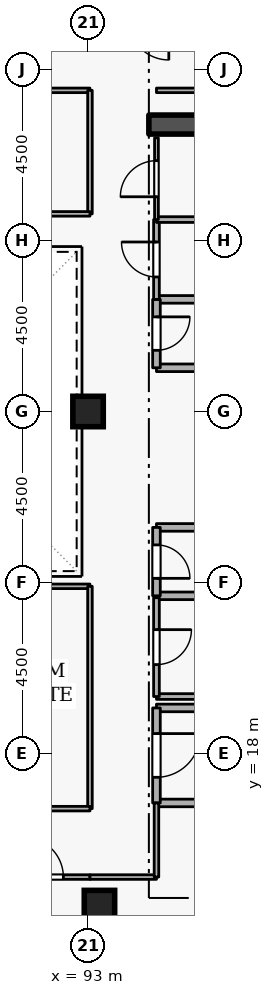
"""IFC4 building model, lengths in metres.
Left out: names, types, materials, properties, quantities, classifications, styles, units other than length and angle.
Written with IfcOpenShell. Run it as: python <this file> out.ifc"""

import sys

from ifc_helpers import new_model, si_unit, direction, frame, frame_2d, origin, origin_2d, place, context, subcontext, project, spatial, rectangle, extrude, element, fill, save


model = new_model("IFC4")
c1 = context("Model", 3, precision=1e-05, world=origin(), true_north=direction((0.0, 1.0)))
c2 = subcontext(c1, "Body", "Model", "MODEL_VIEW")
j1 = project(units=[si_unit("LENGTHUNIT", "METRE"), si_unit("PLANEANGLEUNIT", "RADIAN")], contexts=[c1])
p1 = place(None, origin())
s1 = spatial("IfcSite", under=j1, at=p1, CompositionType="ELEMENT")
p2 = place(p1, origin())
s2 = spatial("IfcBuilding", under=s1, at=p2, CompositionType="ELEMENT")
p3 = place(p2, frame((0.0, 0.0, 254.7)))
s3 = spatial("IfcBuildingStorey", under=s2, at=p3, CompositionType="ELEMENT", Elevation=254.7)
p4 = place(p3, frame((94.6, 34.55, 0.0), z_axis=(0.0, 0.0, 1.0), x_axis=(1.0, 0.0, 0.0)))
e1 = element("IfcWall", 1, at=p4, inside=s3, PredefinedType="SHEAR", context=c2, shape_type="SweptSolid", body=[
    extrude(rectangle(XDim=5.8, YDim=0.5, at=frame_2d((2.9, 0.0))), origin(), (0.0, 0.0, 1.0), 3.6),
])
for number, where, z_axis, x_axis in (
    (2, (93.3, 14.0, 0.0), (0.0, 0.0, 1.0), (1.0, 0.0, 0.0)),
    (3, (93.0, 27.0, 0.0), (0.0, 0.0, 1.0), (1.0, 0.0, 0.0)),
):
    element("IfcColumn", number, at=place(p3, frame(where, z_axis=z_axis, x_axis=x_axis)), inside=s3, PredefinedType="COLUMN", context=c2, shape_type="SweptSolid", body=[
        extrude(rectangle(XDim=0.8, YDim=0.8, at=origin_2d()), origin(), (0.0, 0.0, 1.0), 3.6),
    ])
p5 = place(p3, frame((94.8, 16.7, 0.0), z_axis=(0.0, 0.0, 1.0), x_axis=(1.0, 0.0, 0.0)))
e4 = element("IfcWall", 4, at=p5, inside=s3, PredefinedType="STANDARD", context=c2, shape_type="SweptSolid", body=[
    extrude(rectangle(XDim=5.7, YDim=0.2, at=frame_2d((2.85, 0.0))), origin(), (0.0, 0.0, 1.0), 3.32),
])
p6 = place(p3, frame((97.1, 19.2, 0.0), z_axis=(0.0, 0.0, 1.0), x_axis=(-1.0, 0.0, 0.0)))
e5 = element("IfcWall", 5, at=p6, inside=s3, PredefinedType="STANDARD", context=c2, shape_type="SweptSolid", body=[
    extrude(rectangle(XDim=2.3, YDim=0.2, at=frame_2d((1.15, 0.0))), origin(), (0.0, 0.0, 1.0), 2.525),
])
p7 = place(p3, frame((94.8, 19.2, 0.0), z_axis=(0.0, 0.0, 1.0), x_axis=(0.0, -1.0, 0.0)))
e6 = element("IfcWall", 6, at=p7, inside=s3, PredefinedType="STANDARD", context=c2, shape_type="SweptSolid", body=[
    extrude(rectangle(XDim=2.5, YDim=0.2, at=frame_2d((1.25, 0.0))), origin(), (0.0, 0.0, 1.0), 3.32),
])
p8 = place(p7, frame((0.675, 0.0, 0.0)))
e7 = element("IfcOpeningElement", 7, at=p8, cuts=e6, PredefinedType="OPENING", context=c2, shape_type="SweptSolid", body=[
    extrude(rectangle(XDim=1.15, YDim=2.1, at=frame_2d((0.575, 1.05))), frame((0.0, 0.11, 0.0), z_axis=(0.0, -1.0, 0.0), x_axis=(1.0, 0.0, 0.0)), (0.0, 0.0, 1.0), 0.22),
])
for number, where, z_axis, x_axis in (
    (8, (94.8, 28.15, 0.0), (0.0, 0.0, 1.0), (1.0, 0.0, 0.0)),
    (9, (96.85, 29.95, 0.0), (0.0, 0.0, 1.0), (-1.0, 0.0, 0.0)),
):
    element("IfcWall", number, at=place(p3, frame(where, z_axis=z_axis, x_axis=x_axis)), inside=s3, PredefinedType="STANDARD", context=c2, shape_type="SweptSolid", body=[
        extrude(rectangle(XDim=2.05, YDim=0.2, at=frame_2d((1.025, 0.0))), origin(), (0.0, 0.0, 1.0), 3.32),
    ])
p9 = place(p3, frame((94.8, 29.95, 0.0), z_axis=(0.0, 0.0, 1.0), x_axis=(0.0, -1.0, 0.0)))
e10 = element("IfcWall", 10, at=p9, inside=s3, PredefinedType="STANDARD", context=c2, shape_type="SweptSolid", body=[
    extrude(rectangle(XDim=1.8, YDim=0.2, at=frame_2d((0.9, 0.0))), origin(), (0.0, 0.0, 1.0), 3.32),
])
p10 = place(p9, frame((0.46, 0.0, 0.0)))
e11 = element("IfcOpeningElement", 11, at=p10, cuts=e10, PredefinedType="OPENING", context=c2, shape_type="SweptSolid", body=[
    extrude(rectangle(XDim=0.88, YDim=2.04, at=frame_2d((0.44, 1.02))), frame((0.0, 0.11, 0.0), z_axis=(0.0, -1.0, 0.0), x_axis=(1.0, 0.0, 0.0)), (0.0, 0.0, 1.0), 0.22),
])
for number, where, z_axis, x_axis in (
    (12, (94.8, 22.15, 0.0), (0.0, 0.0, 1.0), (1.0, 0.0, 0.0)),
    (13, (96.85, 23.95, 0.0), (0.0, 0.0, 1.0), (-1.0, 0.0, 0.0)),
):
    element("IfcWall", number, at=place(p3, frame(where, z_axis=z_axis, x_axis=x_axis)), inside=s3, PredefinedType="STANDARD", context=c2, shape_type="SweptSolid", body=[
        extrude(rectangle(XDim=2.05, YDim=0.2, at=frame_2d((1.025, 0.0))), origin(), (0.0, 0.0, 1.0), 3.32),
    ])
p11 = place(p3, frame((94.8, 23.95, 0.0), z_axis=(0.0, 0.0, 1.0), x_axis=(0.0, -1.0, 0.0)))
e14 = element("IfcWall", 14, at=p11, inside=s3, PredefinedType="STANDARD", context=c2, shape_type="SweptSolid", body=[
    extrude(rectangle(XDim=1.8, YDim=0.2, at=frame_2d((0.9, 0.0))), origin(), (0.0, 0.0, 1.0), 3.32),
])
p12 = place(p11, frame((0.46, 0.0, 0.0)))
e15 = element("IfcOpeningElement", 15, at=p12, cuts=e14, PredefinedType="OPENING", context=c2, shape_type="SweptSolid", body=[
    extrude(rectangle(XDim=0.88, YDim=2.04, at=frame_2d((0.44, 1.02))), frame((0.0, 0.11, 0.0), z_axis=(0.0, -1.0, 0.0), x_axis=(1.0, 0.0, 0.0)), (0.0, 0.0, 1.0), 0.22),
])
p13 = place(p3, frame((94.8, 19.5, 0.0), z_axis=(0.0, 0.0, 1.0), x_axis=(1.0, 0.0, 0.0)))
e16 = element("IfcWall", 16, at=p13, inside=s3, PredefinedType="PARTITIONING", context=c2, shape_type="SweptSolid", body=[
    extrude(rectangle(XDim=2.05, YDim=0.15, at=frame_2d((1.025, 0.0))), origin(), (0.0, 0.0, 1.0), 2.525),
])
p14 = place(p3, frame((94.8, 22.1, 0.0), z_axis=(0.0, 0.0, 1.0), x_axis=(0.0, -1.0, 0.0)))
e17 = element("IfcWall", 17, at=p14, inside=s3, PredefinedType="PARTITIONING", context=c2, shape_type="SweptSolid", body=[
    extrude(rectangle(XDim=2.6, YDim=0.15, at=frame_2d((1.3, 0.0))), origin(), (0.0, 0.0, 1.0), 3.32),
])
p15 = place(p14, frame((0.84, 0.0, 0.0)))
e18 = element("IfcOpeningElement", 18, at=p15, cuts=e17, PredefinedType="OPENING", context=c2, shape_type="SweptSolid", body=[
    extrude(rectangle(XDim=0.92, YDim=2.08, at=frame_2d((0.46, 1.04))), frame((0.0, 0.085, 0.0), z_axis=(0.0, -1.0, 0.0), x_axis=(1.0, 0.0, 0.0)), (0.0, 0.0, 1.0), 0.17),
])
p16 = place(p3, frame((94.8, 29.95, 0.0), z_axis=(0.0, 0.0, 1.0), x_axis=(0.0, 1.0, 0.0)))
e19 = element("IfcWall", 19, at=p16, inside=s3, PredefinedType="PARTITIONING", context=c2, shape_type="SweptSolid", body=[
    extrude(rectangle(XDim=2.1, YDim=0.15, at=frame_2d((1.05, 0.0))), origin(), (0.0, 0.0, 1.0), 3.32),
])
p17 = place(p16, frame((0.59, 0.0, 0.0)))
e20 = element("IfcOpeningElement", 20, at=p17, cuts=e19, PredefinedType="OPENING", context=c2, shape_type="SweptSolid", body=[
    extrude(rectangle(XDim=0.92, YDim=2.08, at=frame_2d((0.46, 1.04))), frame((0.0, 0.085, 0.0), z_axis=(0.0, -1.0, 0.0), x_axis=(1.0, 0.0, 0.0)), (0.0, 0.0, 1.0), 0.17),
])
p18 = place(p3, frame((94.8, 32.05, 0.0), z_axis=(0.0, 0.0, 1.0), x_axis=(1.0, 0.0, 0.0)))
e21 = element("IfcWall", 21, at=p18, inside=s3, PredefinedType="PARTITIONING", context=c2, shape_type="SweptSolid", body=[
    extrude(rectangle(XDim=2.05, YDim=0.15, at=frame_2d((1.025, 0.0))), origin(), (0.0, 0.0, 1.0), 3.32),
])
p19 = place(p3, frame((94.8, 32.05, 0.0), z_axis=(0.0, 0.0, 1.0), x_axis=(0.0, 1.0, 0.0)))
e22 = element("IfcWall", 22, at=p19, inside=s3, PredefinedType="PARTITIONING", context=c2, shape_type="SweptSolid", body=[
    extrude(rectangle(XDim=2.15, YDim=0.1, at=frame_2d((1.075, 0.0))), origin(), (0.0, 0.0, 1.0), 3.32),
])
p20 = place(p19, frame((0.6, 0.0, 0.0)))
e23 = element("IfcOpeningElement", 23, at=p20, cuts=e22, PredefinedType="OPENING", context=c2, shape_type="SweptSolid", body=[
    extrude(rectangle(XDim=0.95, YDim=2.1, at=frame_2d((0.475, 1.05))), frame((0.0, 0.06, 0.0), z_axis=(0.0, -1.0, 0.0), x_axis=(1.0, 0.0, 0.0)), (0.0, 0.0, 1.0), 0.12),
])
p21 = place(p3, frame((94.8, 35.45, 0.0), z_axis=(0.0, 0.0, 1.0), x_axis=(1.0, 0.0, 0.0)))
e24 = element("IfcWall", 24, at=p21, inside=s3, PredefinedType="PARTITIONING", context=c2, shape_type="SweptSolid", body=[
    extrude(rectangle(XDim=5.9, YDim=0.12, at=frame_2d((2.95, 0.0))), origin(), (0.0, 0.0, 1.0), 3.32),
])
p22 = place(p3, frame((90.6, 14.75, 0.0), z_axis=(0.0, 0.0, 1.0), x_axis=(1.0, 0.0, 0.0)))
e25 = element("IfcWall", 25, at=p22, inside=s3, PredefinedType="PARTITIONING", context=c2, shape_type="SweptSolid", body=[
    extrude(rectangle(XDim=2.45, YDim=0.12, at=frame_2d((1.225, 0.0))), origin(), (0.0, 0.0, 1.0), 3.32),
])
p23 = place(p22, frame((0.7, 0.0, 0.0)))
e26 = element("IfcOpeningElement", 26, at=p23, cuts=e25, PredefinedType="OPENING", context=c2, shape_type="SweptSolid", body=[
    extrude(rectangle(XDim=1.05, YDim=2.1, at=frame_2d((0.525, 1.05))), frame((0.0, 0.07, 0.0), z_axis=(0.0, -1.0, 0.0), x_axis=(1.0, 0.0, 0.0)), (0.0, 0.0, 1.0), 0.14),
])
p24 = place(p3, frame((93.05, 14.75, 0.0), z_axis=(0.0, 0.0, 1.0), x_axis=(1.0, 0.0, 0.0)))
e27 = element("IfcWall", 27, at=p24, inside=s3, PredefinedType="PARTITIONING", context=c2, shape_type="SweptSolid", body=[
    extrude(rectangle(XDim=1.75, YDim=0.12, at=frame_2d((0.875, 0.0))), origin(), (0.0, 0.0, 1.0), 3.32),
])
p25 = place(p3, frame((94.8, 14.75, 0.0), z_axis=(0.0, 0.0, 1.0), x_axis=(0.0, 1.0, 0.0)))
e28 = element("IfcWall", 28, at=p25, inside=s3, PredefinedType="PARTITIONING", context=c2, shape_type="SweptSolid", body=[
    extrude(rectangle(XDim=1.95, YDim=0.12, at=frame_2d((0.975, 0.0))), origin(), (0.0, 0.0, 1.0), 3.32),
])
p26 = place(p3, frame((83.95, 22.4, 0.0), z_axis=(0.0, 0.0, 1.0), x_axis=(1.0, 0.0, 0.0)))
e29 = element("IfcWall", 29, at=p26, inside=s3, PredefinedType="PARTITIONING", context=c2, shape_type="SweptSolid", body=[
    extrude(rectangle(XDim=9.1, YDim=0.12, at=frame_2d((4.55, 0.0))), origin(), (0.0, 0.0, 1.0), 3.32),
])
p27 = place(p3, frame((93.05, 22.4, 0.0), z_axis=(0.0, 0.0, 1.0), x_axis=(0.0, -1.0, 0.0)))
e30 = element("IfcWall", 30, at=p27, inside=s3, PredefinedType="PARTITIONING", context=c2, shape_type="SweptSolid", body=[
    extrude(rectangle(XDim=5.85, YDim=0.12, at=frame_2d((2.925, 0.0))), origin(), (0.0, 0.0, 1.0), 3.32),
])
p28 = place(p3, frame((93.05, 16.55, 0.0), z_axis=(0.0, 0.0, 1.0), x_axis=(-1.0, 0.0, 0.0)))
e31 = element("IfcWall", 31, at=p28, inside=s3, PredefinedType="PARTITIONING", context=c2, shape_type="SweptSolid", body=[
    extrude(rectangle(XDim=9.1, YDim=0.12, at=frame_2d((4.55, 0.0))), origin(), (0.0, 0.0, 1.0), 3.32),
])
p29 = place(p28, frame((4.075, 0.0, 0.0)))
e32 = element("IfcOpeningElement", 32, at=p29, cuts=e31, PredefinedType="OPENING", context=c2, shape_type="SweptSolid", body=[
    extrude(rectangle(XDim=0.95, YDim=2.1, at=frame_2d((0.475, 1.05))), frame((0.0, 0.07, 0.0), z_axis=(0.0, -1.0, 0.0), x_axis=(1.0, 0.0, 0.0)), (0.0, 0.0, 1.0), 0.14),
])
p30 = place(p3, frame((83.95, 35.45, 0.0), z_axis=(0.0, 0.0, 1.0), x_axis=(1.0, 0.0, 0.0)))
e33 = element("IfcWall", 33, at=p30, inside=s3, PredefinedType="PARTITIONING", context=c2, shape_type="SweptSolid", body=[
    extrude(rectangle(XDim=9.1, YDim=0.12, at=frame_2d((4.55, 0.0))), origin(), (0.0, 0.0, 1.0), 3.32),
])
p31 = place(p30, frame((4.075, 0.0, 0.0)))
e34 = element("IfcOpeningElement", 34, at=p31, cuts=e33, PredefinedType="OPENING", context=c2, shape_type="SweptSolid", body=[
    extrude(rectangle(XDim=0.95, YDim=2.1, at=frame_2d((0.475, 1.05))), frame((0.0, 0.07, 0.0), z_axis=(0.0, -1.0, 0.0), x_axis=(1.0, 0.0, 0.0)), (0.0, 0.0, 1.0), 0.14),
])
p32 = place(p3, frame((93.05, 35.45, 0.0), z_axis=(0.0, 0.0, 1.0), x_axis=(0.0, -1.0, 0.0)))
e35 = element("IfcWall", 35, at=p32, inside=s3, PredefinedType="PARTITIONING", context=c2, shape_type="SweptSolid", body=[
    extrude(rectangle(XDim=3.25, YDim=0.12, at=frame_2d((1.625, 0.0))), origin(), (0.0, 0.0, 1.0), 3.32),
])
p33 = place(p3, frame((93.05, 32.2, 0.0), z_axis=(0.0, 0.0, 1.0), x_axis=(-1.0, 0.0, 0.0)))
e36 = element("IfcWall", 36, at=p33, inside=s3, PredefinedType="PARTITIONING", context=c2, shape_type="SweptSolid", body=[
    extrude(rectangle(XDim=9.1, YDim=0.12, at=frame_2d((4.55, 0.0))), origin(), (0.0, 0.0, 1.0), 3.32),
])
p34 = place(p8, origin())
e37 = element("IfcDoor", 37, at=p34, inside=s3, OperationType="SINGLE_SWING_LEFT", PredefinedType="DOOR", context=c2, shape_type="SweptSolid", body=[
    extrude(rectangle(XDim=1.15, YDim=2.1, at=frame_2d((0.575, 1.05))), frame((0.0, 0.025, 0.0), z_axis=(0.0, -1.0, 0.0), x_axis=(1.0, 0.0, 0.0)), (0.0, 0.0, 1.0), 0.05),
])
fill(e7, e37)
p35 = place(p10, origin())
e38 = element("IfcDoor", 38, at=p35, inside=s3, OperationType="SINGLE_SWING_LEFT", PredefinedType="DOOR", context=c2, shape_type="SweptSolid", body=[
    extrude(rectangle(XDim=0.88, YDim=2.04, at=frame_2d((0.44, 1.02))), frame((0.0, 0.025, 0.0), z_axis=(0.0, -1.0, 0.0), x_axis=(1.0, 0.0, 0.0)), (0.0, 0.0, 1.0), 0.05),
])
fill(e11, e38)
p36 = place(p12, origin())
e39 = element("IfcDoor", 39, at=p36, inside=s3, OperationType="SINGLE_SWING_RIGHT", PredefinedType="DOOR", context=c2, shape_type="SweptSolid", body=[
    extrude(rectangle(XDim=0.88, YDim=2.04, at=frame_2d((0.44, 1.02))), frame((0.0, 0.025, 0.0), z_axis=(0.0, -1.0, 0.0), x_axis=(1.0, 0.0, 0.0)), (0.0, 0.0, 1.0), 0.05),
])
fill(e15, e39)
p37 = place(p15, origin())
e40 = element("IfcDoor", 40, at=p37, inside=s3, OperationType="SINGLE_SWING_LEFT", PredefinedType="DOOR", context=c2, shape_type="SweptSolid", body=[
    extrude(rectangle(XDim=0.92, YDim=2.08, at=frame_2d((0.46, 1.04))), frame((0.0, 0.025, 0.0), z_axis=(0.0, -1.0, 0.0), x_axis=(1.0, 0.0, 0.0)), (0.0, 0.0, 1.0), 0.05),
])
fill(e18, e40)
p38 = place(p17, origin())
e41 = element("IfcDoor", 41, at=p38, inside=s3, OperationType="SINGLE_SWING_RIGHT", PredefinedType="DOOR", context=c2, shape_type="SweptSolid", body=[
    extrude(rectangle(XDim=0.92, YDim=2.08, at=frame_2d((0.46, 1.04))), frame((0.0, 0.025, 0.0), z_axis=(0.0, -1.0, 0.0), x_axis=(1.0, 0.0, 0.0)), (0.0, 0.0, 1.0), 0.05),
])
fill(e20, e41)
p39 = place(p20, origin())
e42 = element("IfcDoor", 42, at=p39, inside=s3, OperationType="SINGLE_SWING_LEFT", PredefinedType="DOOR", context=c2, shape_type="SweptSolid", body=[
    extrude(rectangle(XDim=0.95, YDim=2.1, at=frame_2d((0.475, 1.05))), frame((0.0, 0.025, 0.0), z_axis=(0.0, -1.0, 0.0), x_axis=(1.0, 0.0, 0.0)), (0.0, 0.0, 1.0), 0.05),
])
fill(e23, e42)
p40 = place(p23, origin())
e43 = element("IfcDoor", 43, at=p40, inside=s3, OperationType="SINGLE_SWING_LEFT", PredefinedType="DOOR", context=c2, shape_type="SweptSolid", body=[
    extrude(rectangle(XDim=1.05, YDim=2.1, at=frame_2d((0.525, 1.05))), frame((0.0, 0.025, 0.0), z_axis=(0.0, -1.0, 0.0), x_axis=(1.0, 0.0, 0.0)), (0.0, 0.0, 1.0), 0.05),
])
fill(e26, e43)
save(model, sys.argv[1])
